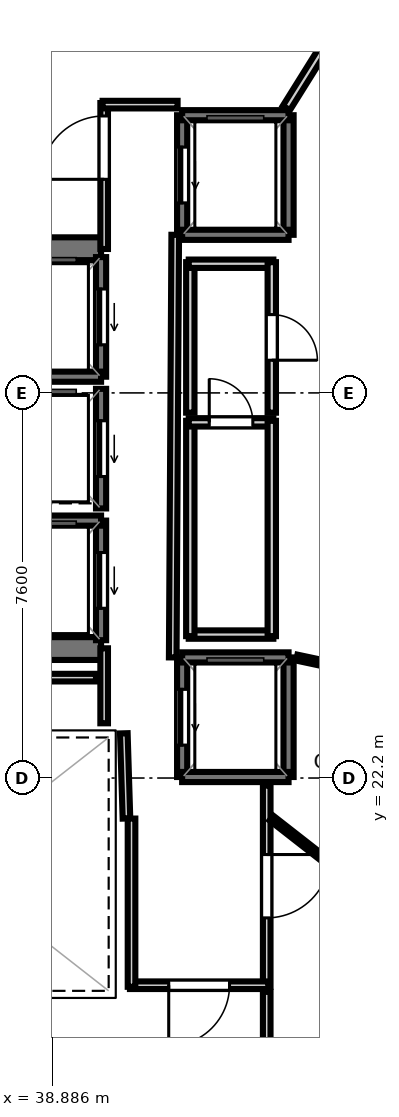
"""IFC4 building model, lengths in metres.
Left out: names, types, materials, properties, quantities, classifications, styles, units other than length and angle.
Written with IfcOpenShell. Run it as: python <this file> out.ifc"""

import sys

from ifc_helpers import new_model, si_unit, direction, frame, frame_2d, origin, place, context, subcontext, project, spatial, rectangle, extrude, element, fill, save


model = new_model("IFC4")
c1 = context("Model", 3, precision=1e-05, world=origin(), true_north=direction((0.0, 1.0)))
c2 = subcontext(c1, "Body", "Model", "MODEL_VIEW")
j1 = project(units=[si_unit("LENGTHUNIT", "METRE"), si_unit("PLANEANGLEUNIT", "RADIAN")], contexts=[c1])
p1 = place(None, origin())
s1 = spatial("IfcSite", under=j1, at=p1, CompositionType="ELEMENT")
p2 = place(p1, origin())
s2 = spatial("IfcBuilding", under=s1, at=p2, CompositionType="ELEMENT")
p3 = place(p2, frame((0.0, 0.0, 351.8)))
s3 = spatial("IfcBuildingStorey", under=s2, at=p3, CompositionType="ELEMENT", Elevation=351.8)
p4 = place(p3, frame((29.33, 32.645, 0.0), z_axis=(0.0, 0.0, 1.0), x_axis=(1.0, 0.0, 0.0)))
e1 = element("IfcWall", 1, at=p4, inside=s3, PredefinedType="SHEAR", context=c2, shape_type="SweptSolid", body=[
    extrude(rectangle(XDim=10.52, YDim=0.45, at=frame_2d((5.26, 0.0))), origin(), (0.0, 0.0, 1.0), 4.3),
])
p5 = place(p4, frame((0.895, 0.0, 0.0)))
e2 = element("IfcOpeningElement", 2, at=p5, cuts=e1, PredefinedType="OPENING", context=c2, shape_type="SweptSolid", body=[
    extrude(rectangle(XDim=1.25, YDim=2.15, at=frame_2d((0.625, 1.075))), frame((0.0, 0.235, 0.0), z_axis=(0.0, -1.0, 0.0), x_axis=(1.0, 0.0, 0.0)), (0.0, 0.0, 1.0), 0.47),
])
p6 = place(p3, frame((29.33, 24.755, 0.0), z_axis=(0.0, 0.0, 1.0), x_axis=(1.0, 0.0, 0.0)))
e3 = element("IfcWall", 3, at=p6, inside=s3, PredefinedType="SHEAR", context=c2, shape_type="SweptSolid", body=[
    extrude(rectangle(XDim=10.52, YDim=0.45, at=frame_2d((5.26, 0.0))), origin(), (0.0, 0.0, 1.0), 4.3),
])
p7 = place(p6, frame((0.695, 0.0, 0.0)))
e4 = element("IfcOpeningElement", 4, at=p7, cuts=e3, PredefinedType="OPENING", context=c2, shape_type="SweptSolid", body=[
    extrude(rectangle(XDim=1.25, YDim=2.15, at=frame_2d((0.625, 1.075))), frame((0.0, 0.235, 0.0), z_axis=(0.0, -1.0, 0.0), x_axis=(1.0, 0.0, 0.0)), (0.0, 0.0, 1.0), 0.47),
])
p8 = place(p3, frame((39.85, 30.12, 0.0), z_axis=(0.0, 0.0, 1.0), x_axis=(0.0, 1.0, 0.0)))
e5 = element("IfcWall", 5, at=p8, inside=s3, PredefinedType="SOLIDWALL", context=c2, shape_type="SweptSolid", body=[
    extrude(rectangle(XDim=2.36, YDim=0.2, at=frame_2d((1.18, 0.0))), origin(), (0.0, 0.0, 1.0), 4.3),
])
p9 = place(p8, frame((0.63, 0.0, 0.0)))
e6 = element("IfcOpeningElement", 6, at=p9, cuts=e5, PredefinedType="OPENING", context=c2, shape_type="SweptSolid", body=[
    extrude(rectangle(XDim=1.1, YDim=2.15, at=frame_2d((0.55, 1.075))), frame((0.0, 0.11, 0.0), z_axis=(0.0, -1.0, 0.0), x_axis=(1.0, 0.0, 0.0)), (0.0, 0.0, 1.0), 0.22),
])
p10 = place(p3, frame((37.75, 30.12, 0.0), z_axis=(0.0, 0.0, 1.0), x_axis=(1.0, 0.0, 0.0)))
e7 = element("IfcWall", 7, at=p10, inside=s3, PredefinedType="SOLIDWALL", context=c2, shape_type="SweptSolid", body=[
    extrude(rectangle(XDim=2.1, YDim=0.2, at=frame_2d((1.05, 0.0))), origin(), (0.0, 0.0, 1.0), 4.3),
])
p11 = place(p3, frame((39.85, 24.92, 0.0), z_axis=(0.0, 0.0, 1.0), x_axis=(0.0, 1.0, 0.0)))
e8 = element("IfcWall", 8, at=p11, inside=s3, PredefinedType="SOLIDWALL", context=c2, shape_type="SweptSolid", body=[
    extrude(rectangle(XDim=2.36, YDim=0.2, at=frame_2d((1.18, 0.0))), origin(), (0.0, 0.0, 1.0), 4.3),
])
p12 = place(p11, frame((0.63, 0.0, 0.0)))
e9 = element("IfcOpeningElement", 9, at=p12, cuts=e8, PredefinedType="OPENING", context=c2, shape_type="SweptSolid", body=[
    extrude(rectangle(XDim=1.1, YDim=2.15, at=frame_2d((0.55, 1.075))), frame((0.0, 0.11, 0.0), z_axis=(0.0, -1.0, 0.0), x_axis=(1.0, 0.0, 0.0)), (0.0, 0.0, 1.0), 0.22),
])
p13 = place(p3, frame((37.75, 27.28, 0.0), z_axis=(0.0, 0.0, 1.0), x_axis=(1.0, 0.0, 0.0)))
e10 = element("IfcWall", 10, at=p13, inside=s3, PredefinedType="SOLIDWALL", context=c2, shape_type="SweptSolid", body=[
    extrude(rectangle(XDim=2.1, YDim=0.2, at=frame_2d((1.05, 0.0))), origin(), (0.0, 0.0, 1.0), 4.3),
])
p14 = place(p3, frame((39.85, 27.52, 0.0), z_axis=(0.0, 0.0, 1.0), x_axis=(0.0, 1.0, 0.0)))
e11 = element("IfcWall", 11, at=p14, inside=s3, PredefinedType="SOLIDWALL", context=c2, shape_type="SweptSolid", body=[
    extrude(rectangle(XDim=2.36, YDim=0.2, at=frame_2d((1.18, 0.0))), origin(), (0.0, 0.0, 1.0), 4.3),
])
p15 = place(p14, frame((0.63, 0.0, 0.0)))
e12 = element("IfcOpeningElement", 12, at=p15, cuts=e11, PredefinedType="OPENING", context=c2, shape_type="SweptSolid", body=[
    extrude(rectangle(XDim=1.1, YDim=2.15, at=frame_2d((0.55, 1.075))), frame((0.0, 0.11, 0.0), z_axis=(0.0, -1.0, 0.0), x_axis=(1.0, 0.0, 0.0)), (0.0, 0.0, 1.0), 0.22),
])
p16 = place(p3, frame((43.55, 22.22, 0.0), z_axis=(0.0, 0.0, 1.0), x_axis=(0.0, 1.0, 0.0)))
e13 = element("IfcWall", 13, at=p16, inside=s3, PredefinedType="SOLIDWALL", context=c2, shape_type="SweptSolid", body=[
    extrude(rectangle(XDim=2.36, YDim=0.2, at=frame_2d((1.18, 0.0))), origin(), (0.0, 0.0, 1.0), 4.3),
])
p17 = place(p3, frame((41.45, 22.22, 0.0), z_axis=(0.0, 0.0, 1.0), x_axis=(0.0, 1.0, 0.0)))
e14 = element("IfcWall", 14, at=p17, inside=s3, PredefinedType="SOLIDWALL", context=c2, shape_type="SweptSolid", body=[
    extrude(rectangle(XDim=2.36, YDim=0.2, at=frame_2d((1.18, 0.0))), origin(), (0.0, 0.0, 1.0), 4.3),
])
p18 = place(p17, frame((0.63, 0.0, 0.0)))
e15 = element("IfcOpeningElement", 15, at=p18, cuts=e14, PredefinedType="OPENING", context=c2, shape_type="SweptSolid", body=[
    extrude(rectangle(XDim=1.1, YDim=2.15, at=frame_2d((0.55, 1.075))), frame((0.0, 0.11, 0.0), z_axis=(0.0, -1.0, 0.0), x_axis=(1.0, 0.0, 0.0)), (0.0, 0.0, 1.0), 0.22),
])
for number, where, z_axis, x_axis in (
    (16, (41.45, 24.58, 0.0), (0.0, 0.0, 1.0), (1.0, 0.0, 0.0)),
    (17, (41.45, 22.22, 0.0), (0.0, 0.0, 1.0), (1.0, 0.0, 0.0)),
):
    element("IfcWall", number, at=place(p3, frame(where, z_axis=z_axis, x_axis=x_axis)), inside=s3, PredefinedType="SOLIDWALL", context=c2, shape_type="SweptSolid", body=[
        extrude(rectangle(XDim=2.1, YDim=0.2, at=frame_2d((1.05, 0.0))), origin(), (0.0, 0.0, 1.0), 4.3),
    ])
p19 = place(p3, frame((43.55, 32.92, 0.0), z_axis=(0.0, 0.0, 1.0), x_axis=(0.0, 1.0, 0.0)))
e18 = element("IfcWall", 18, at=p19, inside=s3, PredefinedType="SOLIDWALL", context=c2, shape_type="SweptSolid", body=[
    extrude(rectangle(XDim=2.36, YDim=0.2, at=frame_2d((1.18, 0.0))), origin(), (0.0, 0.0, 1.0), 4.3),
])
p20 = place(p3, frame((41.45, 32.92, 0.0), z_axis=(0.0, 0.0, 1.0), x_axis=(0.0, 1.0, 0.0)))
e19 = element("IfcWall", 19, at=p20, inside=s3, PredefinedType="SOLIDWALL", context=c2, shape_type="SweptSolid", body=[
    extrude(rectangle(XDim=2.36, YDim=0.2, at=frame_2d((1.18, 0.0))), origin(), (0.0, 0.0, 1.0), 4.3),
])
p21 = place(p20, frame((0.63, 0.0, 0.0)))
e20 = element("IfcOpeningElement", 20, at=p21, cuts=e19, PredefinedType="OPENING", context=c2, shape_type="SweptSolid", body=[
    extrude(rectangle(XDim=1.1, YDim=2.15, at=frame_2d((0.55, 1.075))), frame((0.0, 0.11, 0.0), z_axis=(0.0, -1.0, 0.0), x_axis=(1.0, 0.0, 0.0)), (0.0, 0.0, 1.0), 0.22),
])
for number, where, z_axis, x_axis in (
    (21, (41.45, 35.28, 0.0), (0.0, 0.0, 1.0), (1.0, 0.0, 0.0)),
    (22, (41.45, 32.92, 0.0), (0.0, 0.0, 1.0), (1.0, 0.0, 0.0)),
):
    element("IfcWall", number, at=place(p3, frame(where, z_axis=z_axis, x_axis=x_axis)), inside=s3, PredefinedType="SOLIDWALL", context=c2, shape_type="SweptSolid", body=[
        extrude(rectangle(XDim=2.1, YDim=0.2, at=frame_2d((1.05, 0.0))), origin(), (0.0, 0.0, 1.0), 4.3),
    ])
p22 = place(p3, frame((40.351, 21.401, 0.0), z_axis=(0.0, 0.0, 1.0), x_axis=(-0.031058045979, 0.999517582527, 0.0)))
e23 = element("IfcWall", 23, at=p22, inside=s3, PredefinedType="PARTITIONING", context=c2, shape_type="SweptSolid", body=[
    extrude(rectangle(XDim=1.682, YDim=0.15, at=frame_2d((0.841, 0.0))), origin(), (0.0, 0.0, 1.0), 2.82),
])
p23 = place(p3, frame((39.911, 23.28, 0.0), z_axis=(0.0, 0.0, 1.0), x_axis=(0.0, 1.0, 0.0)))
e24 = element("IfcWall", 24, at=p23, inside=s3, PredefinedType="PARTITIONING", context=c2, shape_type="SweptSolid", body=[
    extrude(rectangle(XDim=1.48, YDim=0.15, at=frame_2d((0.74, 0.0))), origin(), (0.0, 0.0, 1.0), 2.82),
])
p24 = place(p3, frame((39.911, 32.64, 0.0), z_axis=(0.0, 0.0, 1.0), x_axis=(0.0, 1.0, 0.0)))
e25 = element("IfcWall", 25, at=p24, inside=s3, PredefinedType="PARTITIONING", context=c2, shape_type="SweptSolid", body=[
    extrude(rectangle(XDim=2.88, YDim=0.15, at=frame_2d((1.44, 0.0))), origin(), (0.0, 0.0, 1.0), 2.82),
])
p25 = place(p24, frame((1.375, 0.0, 0.0)))
e26 = element("IfcOpeningElement", 26, at=p25, cuts=e25, PredefinedType="OPENING", context=c2, shape_type="SweptSolid", body=[
    extrude(rectangle(XDim=1.25, YDim=2.2, at=frame_2d((0.625, 1.1))), frame((0.0, 0.085, 0.0), z_axis=(0.0, -1.0, 0.0), x_axis=(1.0, 0.0, 0.0)), (0.0, 0.0, 1.0), 0.17),
])
p26 = place(p3, frame((39.88, 35.489, 0.0), z_axis=(0.0, 0.0, 1.0), x_axis=(1.0, 0.0, 0.0)))
e27 = element("IfcWall", 27, at=p26, inside=s3, PredefinedType="PARTITIONING", context=c2, shape_type="SweptSolid", body=[
    extrude(rectangle(XDim=1.48, YDim=0.15, at=frame_2d((0.74, 0.0))), origin(), (0.0, 0.0, 1.0), 2.82),
])
p27 = place(p3, frame((41.313, 32.92, 0.0), z_axis=(0.0, 0.0, 1.0), x_axis=(-0.005942518022, -0.999982343084, 0.0)))
e28 = element("IfcWall", 28, at=p27, inside=s3, PredefinedType="PARTITIONING", context=c2, shape_type="SweptSolid", body=[
    extrude(rectangle(XDim=8.34, YDim=0.15, at=frame_2d((4.17, 0.0))), origin(), (0.0, 0.0, 1.0), 2.82),
])
p28 = place(p3, frame((43.119, 22.05, 0.0), z_axis=(0.0, 0.0, 1.0), x_axis=(0.0, -1.0, 0.0)))
e29 = element("IfcWall", 29, at=p28, inside=s3, PredefinedType="PARTITIONING", context=c2, shape_type="SweptSolid", body=[
    extrude(rectangle(XDim=3.97, YDim=0.15, at=frame_2d((1.985, 0.0))), origin(), (0.0, 0.0, 1.0), 2.82),
])
p29 = place(p28, frame((1.36, 0.0, 0.0)))
e30 = element("IfcOpeningElement", 30, at=p29, cuts=e29, PredefinedType="OPENING", context=c2, shape_type="SweptSolid", body=[
    extrude(rectangle(XDim=1.25, YDim=2.2, at=frame_2d((0.625, 1.1))), frame((0.0, 0.085, 0.0), z_axis=(0.0, -1.0, 0.0), x_axis=(1.0, 0.0, 0.0)), (0.0, 0.0, 1.0), 0.17),
])
p30 = place(p3, frame((43.15, 18.111, 0.0), z_axis=(0.0, 0.0, 1.0), x_axis=(-1.0, 0.0, 0.0)))
e31 = element("IfcWall", 31, at=p30, inside=s3, PredefinedType="PARTITIONING", context=c2, shape_type="SweptSolid", body=[
    extrude(rectangle(XDim=2.73, YDim=0.15, at=frame_2d((1.365, 0.0))), origin(), (0.0, 0.0, 1.0), 2.82),
])
p31 = place(p30, frame((0.765, 0.0, 0.0)))
e32 = element("IfcOpeningElement", 32, at=p31, cuts=e31, PredefinedType="OPENING", context=c2, shape_type="SweptSolid", body=[
    extrude(rectangle(XDim=1.2, YDim=2.15, at=frame_2d((0.6, 1.075))), frame((0.0, 0.085, 0.0), z_axis=(0.0, -1.0, 0.0), x_axis=(1.0, 0.0, 0.0)), (0.0, 0.0, 1.0), 0.17),
])
p32 = place(p3, frame((40.451, 18.08, 0.0), z_axis=(0.0, 0.0, 1.0), x_axis=(0.0, 1.0, 0.0)))
e33 = element("IfcWall", 33, at=p32, inside=s3, PredefinedType="PARTITIONING", context=c2, shape_type="SweptSolid", body=[
    extrude(rectangle(XDim=3.32, YDim=0.15, at=frame_2d((1.66, 0.0))), origin(), (0.0, 0.0, 1.0), 2.82),
])
p33 = place(p3, frame((43.25, 25.031, 0.0), z_axis=(0.0, 0.0, 1.0), x_axis=(-1.0, 0.0, 0.0)))
e34 = element("IfcWall", 34, at=p33, inside=s3, PredefinedType="PLUMBINGWALL", context=c2, shape_type="SweptSolid", body=[
    extrude(rectangle(XDim=1.67, YDim=0.165, at=frame_2d((0.835, 0.0))), origin(), (0.0, 0.0, 1.0), 2.82),
])
p34 = place(p3, frame((41.611, 25.0, 0.0), z_axis=(0.0, 0.0, 1.0), x_axis=(0.0, 1.0, 0.0)))
e35 = element("IfcWall", 35, at=p34, inside=s3, PredefinedType="PLUMBINGWALL", context=c2, shape_type="SweptSolid", body=[
    extrude(rectangle(XDim=4.25, YDim=0.165, at=frame_2d((2.125, 0.0))), origin(), (0.0, 0.0, 1.0), 2.82),
])
p35 = place(p3, frame((41.58, 29.219, 0.0), z_axis=(0.0, 0.0, 1.0), x_axis=(1.0, 0.0, 0.0)))
e36 = element("IfcWall", 36, at=p35, inside=s3, PredefinedType="PLUMBINGWALL", context=c2, shape_type="SweptSolid", body=[
    extrude(rectangle(XDim=1.67, YDim=0.165, at=frame_2d((0.835, 0.0))), origin(), (0.0, 0.0, 1.0), 2.82),
])
p36 = place(p35, frame((0.405, 0.0, 0.0)))
e37 = element("IfcOpeningElement", 37, at=p36, cuts=e36, PredefinedType="OPENING", context=c2, shape_type="SweptSolid", body=[
    extrude(rectangle(XDim=0.86, YDim=2.05, at=frame_2d((0.43, 1.025))), frame((0.0, 0.093, 0.0), z_axis=(0.0, -1.0, 0.0), x_axis=(1.0, 0.0, 0.0)), (0.0, 0.0, 1.0), 0.185),
])
p37 = place(p3, frame((43.219, 29.25, 0.0), z_axis=(0.0, 0.0, 1.0), x_axis=(0.0, -1.0, 0.0)))
e38 = element("IfcWall", 38, at=p37, inside=s3, PredefinedType="PLUMBINGWALL", context=c2, shape_type="SweptSolid", body=[
    extrude(rectangle(XDim=4.25, YDim=0.165, at=frame_2d((2.125, 0.0))), origin(), (0.0, 0.0, 1.0), 2.82),
])
p38 = place(p3, frame((41.611, 29.41, 0.0), z_axis=(0.0, 0.0, 1.0), x_axis=(0.0, 1.0, 0.0)))
e39 = element("IfcWall", 39, at=p38, inside=s3, PredefinedType="PLUMBINGWALL", context=c2, shape_type="SweptSolid", body=[
    extrude(rectangle(XDim=2.97, YDim=0.165, at=frame_2d((1.485, 0.0))), origin(), (0.0, 0.0, 1.0), 2.82),
])
p39 = place(p3, frame((41.58, 32.349, 0.0), z_axis=(0.0, 0.0, 1.0), x_axis=(1.0, 0.0, 0.0)))
e40 = element("IfcWall", 40, at=p39, inside=s3, PredefinedType="PLUMBINGWALL", context=c2, shape_type="SweptSolid", body=[
    extrude(rectangle(XDim=1.67, YDim=0.165, at=frame_2d((0.835, 0.0))), origin(), (0.0, 0.0, 1.0), 2.82),
])
p40 = place(p3, frame((43.219, 32.38, 0.0), z_axis=(0.0, 0.0, 1.0), x_axis=(0.0, -1.0, 0.0)))
e41 = element("IfcWall", 41, at=p40, inside=s3, PredefinedType="PLUMBINGWALL", context=c2, shape_type="SweptSolid", body=[
    extrude(rectangle(XDim=2.97, YDim=0.165, at=frame_2d((1.485, 0.0))), origin(), (0.0, 0.0, 1.0), 2.82),
])
p41 = place(p40, frame((1.035, 0.0, 0.0)))
e42 = element("IfcOpeningElement", 42, at=p41, cuts=e41, PredefinedType="OPENING", context=c2, shape_type="SweptSolid", body=[
    extrude(rectangle(XDim=0.9, YDim=2.1, at=frame_2d((0.45, 1.05))), frame((0.0, 0.093, 0.0), z_axis=(0.0, -1.0, 0.0), x_axis=(1.0, 0.0, 0.0)), (0.0, 0.0, 1.0), 0.185),
])
p42 = place(p3, frame((39.75, 24.181, 0.0), z_axis=(0.0, 0.0, 1.0), x_axis=(-1.0, 0.0, 0.0)))
e43 = element("IfcWall", 43, at=p42, inside=s3, PredefinedType="PARTITIONING", context=c2, shape_type="SweptSolid", body=[
    extrude(rectangle(XDim=6.22, YDim=0.15, at=frame_2d((3.11, 0.0))), origin(), (0.0, 0.0, 1.0), 2.82),
])
p43 = place(p3, frame((43.119, 17.98, 0.0), z_axis=(0.0, 0.0, 1.0), x_axis=(0.0, -1.0, 0.0)))
e44 = element("IfcWall", 44, at=p43, inside=s3, PredefinedType="PARTITIONING", context=c2, shape_type="SweptSolid", body=[
    extrude(rectangle(XDim=2.43, YDim=0.15, at=frame_2d((1.215, 0.0))), origin(), (0.0, 0.0, 1.0), 2.82),
])
p44 = place(p3, frame((43.211, 21.41, 0.0), z_axis=(0.0, 0.0, 1.0), x_axis=(0.788014562356, -0.615656600318, 0.0)))
e45 = element("IfcWall", 45, at=p44, inside=s3, PredefinedType="PARTITIONING", context=c2, shape_type="SweptSolid", body=[
    extrude(rectangle(XDim=4.527, YDim=0.12, at=frame_2d((2.264, 0.0))), origin(), (0.0, 0.0, 1.0), 2.82),
])
p45 = place(p44, frame((1.638, 0.0, 0.0)))
e46 = element("IfcOpeningElement", 46, at=p45, cuts=e45, PredefinedType="OPENING", context=c2, shape_type="SweptSolid", body=[
    extrude(rectangle(XDim=1.25, YDim=2.2, at=frame_2d((0.625, 1.1))), frame((0.0, 0.07, 0.0), z_axis=(0.0, -1.0, 0.0), x_axis=(1.0, 0.0, 0.0)), (0.0, 0.0, 1.0), 0.14),
])
p46 = place(p3, frame((43.713, 24.576, 0.0), z_axis=(0.0, 0.0, 1.0), x_axis=(0.978143673995, -0.207930163816, 0.0)))
e47 = element("IfcWall", 47, at=p46, inside=s3, PredefinedType="PARTITIONING", context=c2, shape_type="SweptSolid", body=[
    extrude(rectangle(XDim=5.152, YDim=0.12, at=frame_2d((2.576, 0.0))), origin(), (0.0, 0.0, 1.0), 2.82),
])
p47 = place(p46, frame((3.106, 0.0, 0.0)))
e48 = element("IfcOpeningElement", 48, at=p47, cuts=e47, PredefinedType="OPENING", context=c2, shape_type="SweptSolid", body=[
    extrude(rectangle(XDim=0.9, YDim=2.1, at=frame_2d((0.45, 1.05))), frame((0.0, 0.07, 0.0), z_axis=(0.0, -1.0, 0.0), x_axis=(1.0, 0.0, 0.0)), (0.0, 0.0, 1.0), 0.14),
])
p48 = place(p3, frame((43.508, 35.424, 0.0), z_axis=(0.0, 0.0, 1.0), x_axis=(0.529920277959, 0.848047462709, 0.0)))
e49 = element("IfcWall", 49, at=p48, inside=s3, PredefinedType="PLUMBINGWALL", context=c2, shape_type="SweptSolid", body=[
    extrude(rectangle(XDim=11.438, YDim=0.165, at=frame_2d((5.719, 0.0))), origin(), (0.0, 0.0, 1.0), 2.82),
])
p49 = place(p9, origin())
e50 = element("IfcDoor", 50, at=p49, inside=s3, OperationType="SLIDING_TO_LEFT", PredefinedType="DOOR", context=c2, shape_type="SweptSolid", body=[
    extrude(rectangle(XDim=1.1, YDim=2.15, at=frame_2d((0.55, 1.075))), frame((0.0, 0.025, 0.0), z_axis=(0.0, -1.0, 0.0), x_axis=(1.0, 0.0, 0.0)), (0.0, 0.0, 1.0), 0.05),
])
fill(e6, e50)
p50 = place(p12, origin())
e51 = element("IfcDoor", 51, at=p50, inside=s3, OperationType="SLIDING_TO_LEFT", PredefinedType="DOOR", context=c2, shape_type="SweptSolid", body=[
    extrude(rectangle(XDim=1.1, YDim=2.15, at=frame_2d((0.55, 1.075))), frame((0.0, 0.025, 0.0), z_axis=(0.0, -1.0, 0.0), x_axis=(1.0, 0.0, 0.0)), (0.0, 0.0, 1.0), 0.05),
])
fill(e9, e51)
p51 = place(p15, origin())
e52 = element("IfcDoor", 52, at=p51, inside=s3, OperationType="SLIDING_TO_LEFT", PredefinedType="DOOR", context=c2, shape_type="SweptSolid", body=[
    extrude(rectangle(XDim=1.1, YDim=2.15, at=frame_2d((0.55, 1.075))), frame((0.0, 0.025, 0.0), z_axis=(0.0, -1.0, 0.0), x_axis=(1.0, 0.0, 0.0)), (0.0, 0.0, 1.0), 0.05),
])
fill(e12, e52)
p52 = place(p18, origin())
e53 = element("IfcDoor", 53, at=p52, inside=s3, OperationType="SLIDING_TO_LEFT", PredefinedType="DOOR", context=c2, shape_type="SweptSolid", body=[
    extrude(rectangle(XDim=1.1, YDim=2.15, at=frame_2d((0.55, 1.075))), frame((0.0, 0.025, 0.0), z_axis=(0.0, -1.0, 0.0), x_axis=(1.0, 0.0, 0.0)), (0.0, 0.0, 1.0), 0.05),
])
fill(e15, e53)
p53 = place(p21, origin())
e54 = element("IfcDoor", 54, at=p53, inside=s3, OperationType="SLIDING_TO_LEFT", PredefinedType="DOOR", context=c2, shape_type="SweptSolid", body=[
    extrude(rectangle(XDim=1.1, YDim=2.15, at=frame_2d((0.55, 1.075))), frame((0.0, 0.025, 0.0), z_axis=(0.0, -1.0, 0.0), x_axis=(1.0, 0.0, 0.0)), (0.0, 0.0, 1.0), 0.05),
])
fill(e20, e54)
p54 = place(p31, origin())
e55 = element("IfcDoor", 55, at=p54, inside=s3, OperationType="SINGLE_SWING_RIGHT", PredefinedType="DOOR", context=c2, shape_type="SweptSolid", body=[
    extrude(rectangle(XDim=1.2, YDim=2.15, at=frame_2d((0.6, 1.075))), frame((0.0, 0.025, 0.0), z_axis=(0.0, -1.0, 0.0), x_axis=(1.0, 0.0, 0.0)), (0.0, 0.0, 1.0), 0.05),
])
fill(e32, e55)
p55 = place(p29, origin())
e56 = element("IfcDoor", 56, at=p55, inside=s3, OperationType="SINGLE_SWING_LEFT", PredefinedType="DOOR", context=c2, shape_type="SweptSolid", body=[
    extrude(rectangle(XDim=1.25, YDim=2.2, at=frame_2d((0.625, 1.1))), frame((0.0, 0.025, 0.0), z_axis=(0.0, -1.0, 0.0), x_axis=(1.0, 0.0, 0.0)), (0.0, 0.0, 1.0), 0.05),
])
fill(e30, e56)
p56 = place(p25, origin())
e57 = element("IfcDoor", 57, at=p56, inside=s3, OperationType="SINGLE_SWING_LEFT", PredefinedType="DOOR", context=c2, shape_type="SweptSolid", body=[
    extrude(rectangle(XDim=1.25, YDim=2.2, at=frame_2d((0.625, 1.1))), frame((0.0, 0.025, 0.0), z_axis=(0.0, -1.0, 0.0), x_axis=(1.0, 0.0, 0.0)), (0.0, 0.0, 1.0), 0.05),
])
fill(e26, e57)
p57 = place(p41, origin())
e58 = element("IfcDoor", 58, at=p57, inside=s3, OperationType="SINGLE_SWING_RIGHT", PredefinedType="DOOR", context=c2, shape_type="SweptSolid", body=[
    extrude(rectangle(XDim=0.9, YDim=2.1, at=frame_2d((0.45, 1.05))), frame((0.0, 0.025, 0.0), z_axis=(0.0, -1.0, 0.0), x_axis=(1.0, 0.0, 0.0)), (0.0, 0.0, 1.0), 0.05),
])
fill(e42, e58)
p58 = place(p36, origin())
e59 = element("IfcDoor", 59, at=p58, inside=s3, OperationType="SINGLE_SWING_LEFT", PredefinedType="DOOR", context=c2, shape_type="SweptSolid", body=[
    extrude(rectangle(XDim=0.86, YDim=2.05, at=frame_2d((0.43, 1.025))), frame((0.0, 0.025, 0.0), z_axis=(0.0, -1.0, 0.0), x_axis=(1.0, 0.0, 0.0)), (0.0, 0.0, 1.0), 0.05),
])
fill(e37, e59)
save(model, sys.argv[1])
